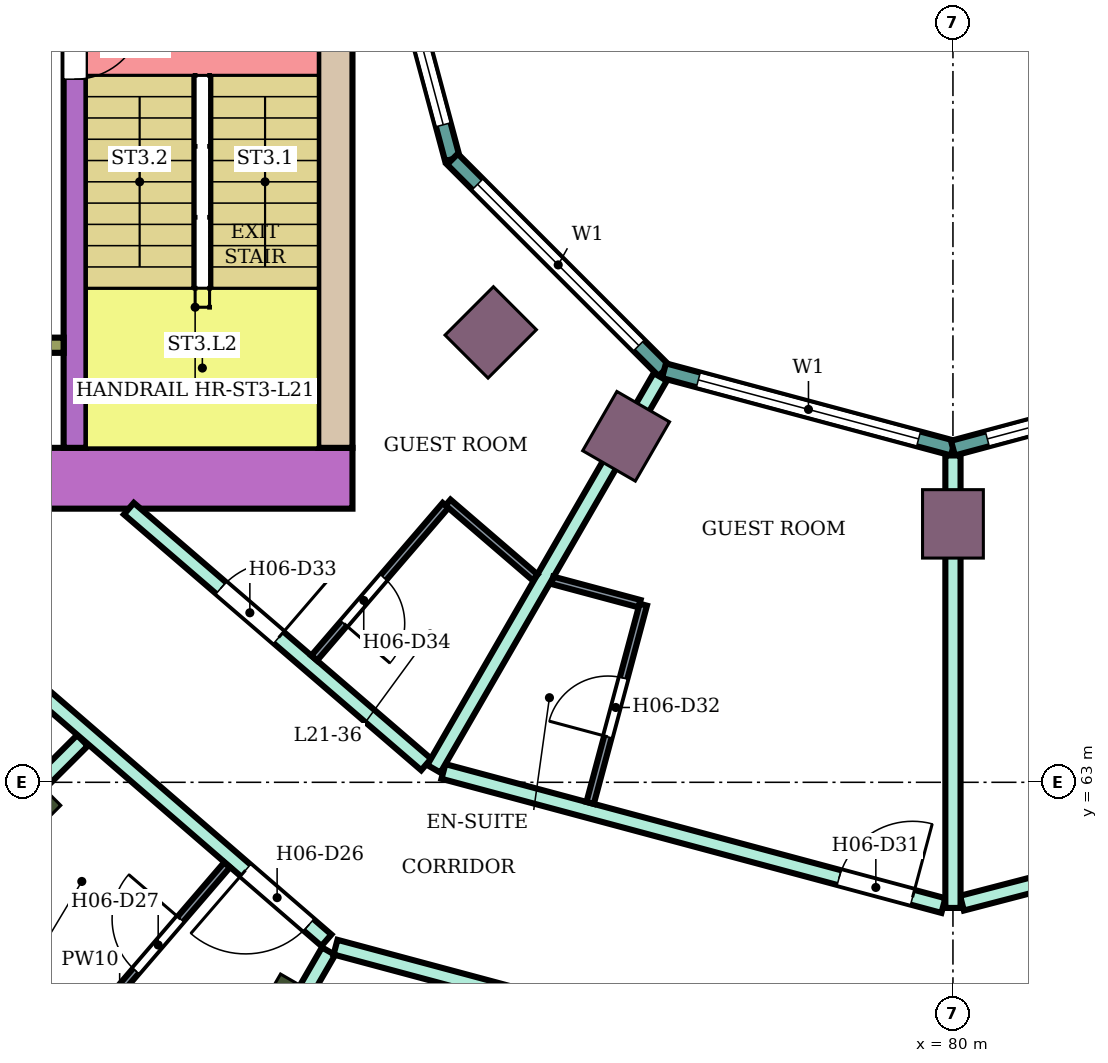
"""IFC4 building model, lengths in metres.
Left out: names, types, materials, properties, quantities, classifications, styles, units other than length and angle.
Written with IfcOpenShell. Run it as: python <this file> out.ifc"""

import sys

from ifc_helpers import new_model, si_unit, direction, frame, frame_2d, origin, origin_2d, place, context, subcontext, project, spatial, rectangle, extrude, element, fill, save


model = new_model("IFC4")
c1 = context("Model", 3, precision=1e-05, world=origin(), true_north=direction((0.0, 1.0)))
c2 = subcontext(c1, "Body", "Model", "MODEL_VIEW")
j1 = project(units=[si_unit("LENGTHUNIT", "METRE"), si_unit("PLANEANGLEUNIT", "RADIAN")], contexts=[c1])
p1 = place(None, origin())
s1 = spatial("IfcSite", under=j1, at=p1, CompositionType="ELEMENT")
p2 = place(p1, origin())
s2 = spatial("IfcBuilding", under=s1, at=p2, CompositionType="ELEMENT")
p3 = place(p2, frame((0.0, 0.0, 93.8)))
s3 = spatial("IfcBuildingStorey", under=s2, at=p3, CompositionType="ELEMENT", Elevation=93.8)
for number, where, z_axis, x_axis in (
    (1, (67.555, 62.555, 0.0), (0.0, 0.0, 1.0), (-0.707, -0.707, 0.0)),
    (2, (71.2, 59.758, 0.0), (0.0, 0.0, 1.0), (-0.5, -0.866, 0.0)),
):
    element("IfcColumn", number, at=place(p3, frame(where, z_axis=z_axis, x_axis=x_axis)), inside=s3, PredefinedType="COLUMN", context=c2, shape_type="SweptSolid", body=[
        extrude(rectangle(XDim=1.2, YDim=0.8, at=origin_2d()), origin(), (0.0, 0.0, 1.0), 3.8),
    ])
for number, where, z_axis, x_axis in (
    (3, (73.919, 68.919, 0.0), (0.0, 0.0, 1.0), (-0.707, -0.707, 0.0)),
    (4, (75.7, 67.552, 0.0), (0.0, 0.0, 1.0), (-0.5, -0.866, 0.0)),
    (5, (80.0, 66.4, 0.0), (0.0, 0.0, 1.0), (0.0, -1.0, 0.0)),
):
    element("IfcColumn", number, at=place(p3, frame(where, z_axis=z_axis, x_axis=x_axis)), inside=s3, PredefinedType="COLUMN", context=c2, shape_type="SweptSolid", body=[
        extrude(rectangle(XDim=0.9, YDim=0.8, at=origin_2d()), origin(), (0.0, 0.0, 1.0), 3.8),
    ])
p4 = place(p3, frame((72.1, 67.0, 0.0), z_axis=(0.0, 0.0, 1.0), x_axis=(-1.0, 0.0, 0.0)))
e6 = element("IfcWall", 6, at=p4, inside=s3, PredefinedType="SHEAR", context=c2, shape_type="SweptSolid", body=[
    extrude(rectangle(XDim=14.7, YDim=0.8, at=frame_2d((7.35, 0.0))), origin(), (0.0, 0.0, 1.0), 3.48),
])
p5 = place(p4, frame((4.2, 0.0, 0.0)))
e7 = element("IfcOpeningElement", 7, at=p5, cuts=e6, PredefinedType="OPENING", context=c2, shape_type="SweptSolid", body=[
    extrude(rectangle(XDim=2.4, YDim=2.4, at=frame_2d((1.2, 1.2))), frame((0.0, 0.41, 0.0), z_axis=(0.0, -1.0, 0.0), x_axis=(1.0, 0.0, 0.0)), (0.0, 0.0, 1.0), 0.82),
])
p6 = place(p3, frame((71.875, 75.0, 0.0), z_axis=(0.0, 0.0, 1.0), x_axis=(0.0, -1.0, 0.0)))
e8 = element("IfcWall", 8, at=p6, inside=s3, PredefinedType="SHEAR", context=c2, shape_type="SweptSolid", body=[
    extrude(rectangle(XDim=7.6, YDim=0.45, at=frame_2d((3.8, 0.0))), origin(), (0.0, 0.0, 1.0), 3.48),
])
p7 = place(p3, frame((68.45, 75.0, 0.0), z_axis=(0.0, 0.0, 1.0), x_axis=(0.0, -1.0, 0.0)))
e9 = element("IfcWall", 9, at=p7, inside=s3, PredefinedType="SHEAR", context=c2, shape_type="SweptSolid", body=[
    extrude(rectangle(XDim=7.6, YDim=0.3, at=frame_2d((3.8, 0.0))), origin(), (0.0, 0.0, 1.0), 3.48),
])
p8 = place(p7, frame((1.85, 0.0, 0.0)))
e10 = element("IfcOpeningElement", 10, at=p8, cuts=e9, PredefinedType="OPENING", context=c2, shape_type="SweptSolid", body=[
    extrude(rectangle(XDim=0.9, YDim=2.1, at=frame_2d((0.45, 1.05))), frame((0.0, 0.16, 0.0), z_axis=(0.0, -1.0, 0.0), x_axis=(1.0, 0.0, 0.0)), (0.0, 0.0, 1.0), 0.32),
])
p9 = place(p3, frame((68.3, 68.75, 0.0), z_axis=(0.0, 0.0, 1.0), x_axis=(-1.0, 0.0, 0.0)))
e11 = element("IfcWall", 11, at=p9, inside=s3, PredefinedType="SHEAR", context=c2, shape_type="SweptSolid", body=[
    extrude(rectangle(XDim=4.65, YDim=0.2, at=frame_2d((2.325, 0.0))), origin(), (0.0, 0.0, 1.0), 3.48),
])
p10 = place(p3, frame((72.396, 75.0, 0.0), z_axis=(0.0, 0.0, 1.0), x_axis=(0.258789828301, -0.965933654434, 0.0)))
e12 = element("IfcWall", 12, at=p10, inside=s3, PredefinedType="NOTDEFINED", context=c2, shape_type="SweptSolid", body=[
    extrude(rectangle(XDim=3.936, YDim=0.2, at=frame_2d((1.968, 0.0))), origin(), (0.0, 0.0, 1.0), 3.8),
])
p11 = place(p10, frame((0.468, 0.0, 0.9)))
e13 = element("IfcOpeningElement", 13, at=p11, cuts=e12, PredefinedType="OPENING", context=c2, shape_type="SweptSolid", body=[
    extrude(rectangle(XDim=3.0, YDim=2.3, at=frame_2d((1.5, 1.15))), frame((0.0, 0.11, 0.0), z_axis=(0.0, -1.0, 0.0), x_axis=(1.0, 0.0, 0.0)), (0.0, 0.0, 1.0), 0.22),
])
p12 = place(p3, frame((73.415, 71.198, 0.0), z_axis=(0.0, 0.0, 1.0), x_axis=(0.707106781187, -0.707106781187, 0.0)))
e14 = element("IfcWall", 14, at=p12, inside=s3, PredefinedType="NOTDEFINED", context=c2, shape_type="SweptSolid", body=[
    extrude(rectangle(XDim=3.936, YDim=0.2, at=frame_2d((1.968, 0.0))), origin(), (0.0, 0.0, 1.0), 3.8),
])
p13 = place(p12, frame((0.468, 0.0, 0.9)))
e15 = element("IfcOpeningElement", 15, at=p13, cuts=e14, PredefinedType="OPENING", context=c2, shape_type="SweptSolid", body=[
    extrude(rectangle(XDim=3.0, YDim=2.3, at=frame_2d((1.5, 1.15))), frame((0.0, 0.11, 0.0), z_axis=(0.0, -1.0, 0.0), x_axis=(1.0, 0.0, 0.0)), (0.0, 0.0, 1.0), 0.22),
])
p14 = place(p3, frame((76.198, 68.415, 0.0), z_axis=(0.0, 0.0, 1.0), x_axis=(0.965933654434, -0.258789828301, 0.0)))
e16 = element("IfcWall", 16, at=p14, inside=s3, PredefinedType="NOTDEFINED", context=c2, shape_type="SweptSolid", body=[
    extrude(rectangle(XDim=3.936, YDim=0.2, at=frame_2d((1.968, 0.0))), origin(), (0.0, 0.0, 1.0), 3.8),
])
p15 = place(p14, frame((0.468, 0.0, 0.9)))
e17 = element("IfcOpeningElement", 17, at=p15, cuts=e16, PredefinedType="OPENING", context=c2, shape_type="SweptSolid", body=[
    extrude(rectangle(XDim=3.0, YDim=2.3, at=frame_2d((1.5, 1.15))), frame((0.0, 0.11, 0.0), z_axis=(0.0, -1.0, 0.0), x_axis=(1.0, 0.0, 0.0)), (0.0, 0.0, 1.0), 0.22),
])
p16 = place(p3, frame((80.0, 67.396, 0.0), z_axis=(0.0, 0.0, 1.0), x_axis=(0.965933654434, 0.258789828301, 0.0)))
e18 = element("IfcWall", 18, at=p16, inside=s3, PredefinedType="NOTDEFINED", context=c2, shape_type="SweptSolid", body=[
    extrude(rectangle(XDim=3.936, YDim=0.2, at=frame_2d((1.968, 0.0))), origin(), (0.0, 0.0, 1.0), 3.8),
])
p17 = place(p16, frame((0.468, 0.0, 0.9)))
e19 = element("IfcOpeningElement", 19, at=p17, cuts=e18, PredefinedType="OPENING", context=c2, shape_type="SweptSolid", body=[
    extrude(rectangle(XDim=3.0, YDim=2.3, at=frame_2d((1.5, 1.15))), frame((0.0, 0.11, 0.0), z_axis=(0.0, -1.0, 0.0), x_axis=(1.0, 0.0, 0.0)), (0.0, 0.0, 1.0), 0.22),
])
p18 = place(p3, frame((63.594, 58.598, 0.0), z_axis=(0.0, 0.0, 1.0), x_axis=(0.707228748718, 0.706984792613, 0.0)))
e20 = element("IfcWall", 20, at=p18, inside=s3, PredefinedType="PARTITIONING", context=c2, shape_type="SweptSolid", body=[
    extrude(rectangle(XDim=7.005, YDim=0.2, at=frame_2d((3.503, 0.0))), origin(), (0.0, 0.0, 1.0), 3.35),
])
p19 = place(p3, frame((67.079, 64.968, 0.0), z_axis=(0.0, 0.0, 1.0), x_axis=(0.756371089567, -0.654142778656, 0.0)))
e21 = element("IfcWall", 21, at=p19, inside=s3, PredefinedType="PARTITIONING", context=c2, shape_type="SweptSolid", body=[
    extrude(rectangle(XDim=6.185, YDim=0.2, at=frame_2d((3.093, 0.0))), origin(), (0.0, 0.0, 1.0), 3.35),
])
p20 = place(p19, frame((4.778, 0.0, 0.0)))
e22 = element("IfcOpeningElement", 22, at=p20, cuts=e21, PredefinedType="OPENING", context=c2, shape_type="SweptSolid", body=[
    extrude(rectangle(XDim=1.1, YDim=2.1, at=frame_2d((0.55, 1.05))), frame((0.0, 0.11, 0.0), z_axis=(0.0, -1.0, 0.0), x_axis=(1.0, 0.0, 0.0)), (0.0, 0.0, 1.0), 0.22),
])
p21 = place(p3, frame((67.096, 52.662, 0.0), z_axis=(0.0, 0.0, 1.0), x_axis=(0.500222922337, 0.865896661253, 0.0)))
e23 = element("IfcWall", 23, at=p21, inside=s3, PredefinedType="PARTITIONING", context=c2, shape_type="SweptSolid", body=[
    extrude(rectangle(XDim=9.374, YDim=0.2, at=frame_2d((4.687, 0.0))), origin(), (0.0, 0.0, 1.0), 3.35),
])
p22 = place(p3, frame((69.158, 66.6, 0.0), z_axis=(0.0, 0.0, 1.0), x_axis=(0.757976058094, -0.652282373943, 0.0)))
e24 = element("IfcWall", 24, at=p22, inside=s3, PredefinedType="PARTITIONING", context=c2, shape_type="SweptSolid", body=[
    extrude(rectangle(XDim=5.16, YDim=0.2, at=frame_2d((2.58, 0.0))), origin(), (0.0, 0.0, 1.0), 3.35),
])
p23 = place(p22, frame((1.6, 0.0, 0.0)))
e25 = element("IfcOpeningElement", 25, at=p23, cuts=e24, PredefinedType="OPENING", context=c2, shape_type="SweptSolid", body=[
    extrude(rectangle(XDim=1.0, YDim=2.1, at=frame_2d((0.5, 1.05))), frame((0.0, 0.11, 0.0), z_axis=(0.0, -1.0, 0.0), x_axis=(1.0, 0.0, 0.0)), (0.0, 0.0, 1.0), 0.22),
])
p24 = place(p3, frame((71.877, 60.831, 0.0), z_axis=(0.0, 0.0, 1.0), x_axis=(0.965905026676, -0.258896657842, 0.0)))
e26 = element("IfcWall", 26, at=p24, inside=s3, PredefinedType="PARTITIONING", context=c2, shape_type="SweptSolid", body=[
    extrude(rectangle(XDim=8.36, YDim=0.2, at=frame_2d((4.18, 0.0))), origin(), (0.0, 0.0, 1.0), 3.35),
])
p25 = place(p24, frame((4.655, 0.0, 0.0)))
e27 = element("IfcOpeningElement", 27, at=p25, cuts=e26, PredefinedType="OPENING", context=c2, shape_type="SweptSolid", body=[
    extrude(rectangle(XDim=1.8, YDim=2.1, at=frame_2d((0.9, 1.05))), frame((0.0, 0.11, 0.0), z_axis=(0.0, -1.0, 0.0), x_axis=(1.0, 0.0, 0.0)), (0.0, 0.0, 1.0), 0.22),
])
p26 = place(p3, frame((73.297, 63.143, 0.0), z_axis=(0.0, 0.0, 1.0), x_axis=(0.965859030528, -0.25906820173, 0.0)))
e28 = element("IfcWall", 28, at=p26, inside=s3, PredefinedType="PARTITIONING", context=c2, shape_type="SweptSolid", body=[
    extrude(rectangle(XDim=6.81, YDim=0.2, at=frame_2d((3.405, 0.0))), origin(), (0.0, 0.0, 1.0), 3.35),
])
p27 = place(p26, frame((5.39, 0.0, 0.0)))
e29 = element("IfcOpeningElement", 29, at=p27, cuts=e28, PredefinedType="OPENING", context=c2, shape_type="SweptSolid", body=[
    extrude(rectangle(XDim=1.0, YDim=2.1, at=frame_2d((0.5, 1.05))), frame((0.0, 0.11, 0.0), z_axis=(0.0, -1.0, 0.0), x_axis=(1.0, 0.0, 0.0)), (0.0, 0.0, 1.0), 0.22),
])
p28 = place(p3, frame((73.171, 63.177, 0.0), z_axis=(0.0, 0.0, 1.0), x_axis=(0.500257106344, 0.865876912472, 0.0)))
e30 = element("IfcWall", 30, at=p28, inside=s3, PredefinedType="PARTITIONING", context=c2, shape_type="SweptSolid", body=[
    extrude(rectangle(XDim=5.955, YDim=0.2, at=frame_2d((2.978, 0.0))), origin(), (0.0, 0.0, 1.0), 3.35),
])
p29 = place(p3, frame((80.119, 61.41, 0.0), z_axis=(0.0, 0.0, 1.0), x_axis=(0.967823361235, 0.251630565408, 0.0)))
e31 = element("IfcWall", 31, at=p29, inside=s3, PredefinedType="PARTITIONING", context=c2, shape_type="SweptSolid", body=[
    extrude(rectangle(XDim=6.958, YDim=0.2, at=frame_2d((3.479, 0.0))), origin(), (0.0, 0.0, 1.0), 3.35),
])
p30 = place(p29, frame((2.529, 0.0, 0.0)))
e32 = element("IfcOpeningElement", 32, at=p30, cuts=e31, PredefinedType="OPENING", context=c2, shape_type="SweptSolid", body=[
    extrude(rectangle(XDim=1.8, YDim=2.1, at=frame_2d((0.9, 1.05))), frame((0.0, 0.11, 0.0), z_axis=(0.0, -1.0, 0.0), x_axis=(1.0, 0.0, 0.0)), (0.0, 0.0, 1.0), 0.22),
])
p31 = place(p3, frame((80.0, 58.655, 0.0), z_axis=(0.0, 0.0, 1.0), x_axis=(0.965967338894, 0.258664068224, 0.0)))
e33 = element("IfcWall", 33, at=p31, inside=s3, PredefinedType="PARTITIONING", context=c2, shape_type="SweptSolid", body=[
    extrude(rectangle(XDim=8.36, YDim=0.2, at=frame_2d((4.18, 0.0))), origin(), (0.0, 0.0, 1.0), 3.35),
])
p32 = place(p31, frame((6.86, 0.0, 0.0)))
e34 = element("IfcOpeningElement", 34, at=p32, cuts=e33, PredefinedType="OPENING", context=c2, shape_type="SweptSolid", body=[
    extrude(rectangle(XDim=1.0, YDim=2.1, at=frame_2d((0.5, 1.05))), frame((0.0, 0.11, 0.0), z_axis=(0.0, -1.0, 0.0), x_axis=(1.0, 0.0, 0.0)), (0.0, 0.0, 1.0), 0.22),
])
p33 = place(p3, frame((80.0, 61.347, 0.0), z_axis=(0.0, 0.0, 1.0), x_axis=(0.0, 1.0, 0.0)))
e35 = element("IfcWall", 35, at=p33, inside=s3, PredefinedType="PARTITIONING", context=c2, shape_type="SweptSolid", body=[
    extrude(rectangle(XDim=5.953, YDim=0.2, at=frame_2d((2.977, 0.0))), origin(), (0.0, 0.0, 1.0), 3.35),
])
p34 = place(p3, frame((66.576, 61.435, 0.0), z_axis=(0.0, 0.0, 1.0), x_axis=(0.757970550281, -0.652288774169, 0.0)))
e36 = element("IfcWall", 36, at=p34, inside=s3, PredefinedType="PARTITIONING", context=c2, shape_type="SweptSolid", body=[
    extrude(rectangle(XDim=2.576, YDim=0.1, at=frame_2d((1.288, 0.0))), origin(), (0.0, 0.0, 1.0), 3.35),
])
p35 = place(p3, frame((68.566, 59.722, 0.0), z_axis=(0.0, 0.0, 1.0), x_axis=(0.65193146671, 0.758277892803, 0.0)))
e37 = element("IfcWall", 37, at=p35, inside=s3, PredefinedType="PARTITIONING", context=c2, shape_type="SweptSolid", body=[
    extrude(rectangle(XDim=2.89, YDim=0.1, at=frame_2d((1.445, 0.0))), origin(), (0.0, 0.0, 1.0), 3.35),
])
p36 = place(p35, frame((1.05, 0.0, 0.0)))
e38 = element("IfcOpeningElement", 38, at=p36, cuts=e37, PredefinedType="OPENING", context=c2, shape_type="SweptSolid", body=[
    extrude(rectangle(XDim=0.9, YDim=2.1, at=frame_2d((0.45, 1.05))), frame((0.0, 0.06, 0.0), z_axis=(0.0, -1.0, 0.0), x_axis=(1.0, 0.0, 0.0)), (0.0, 0.0, 1.0), 0.12),
])
p37 = place(p3, frame((71.596, 64.635, 0.0), z_axis=(0.0, 0.0, 1.0), x_axis=(0.652285007511, 0.757973791748, 0.0)))
e39 = element("IfcWall", 39, at=p37, inside=s3, PredefinedType="PARTITIONING", context=c2, shape_type="SweptSolid", body=[
    extrude(rectangle(XDim=2.65, YDim=0.1, at=frame_2d((1.325, 0.0))), origin(), (0.0, 0.0, 1.0), 3.35),
])
p38 = place(p37, frame((0.6, 0.0, 0.0)))
e40 = element("IfcOpeningElement", 40, at=p38, cuts=e39, PredefinedType="OPENING", context=c2, shape_type="SweptSolid", body=[
    extrude(rectangle(XDim=0.8, YDim=2.1, at=frame_2d((0.4, 1.05))), frame((0.0, 0.06, 0.0), z_axis=(0.0, -1.0, 0.0), x_axis=(1.0, 0.0, 0.0)), (0.0, 0.0, 1.0), 0.12),
])
p39 = place(p3, frame((73.357, 66.681, 0.0), z_axis=(0.0, 0.0, 1.0), x_axis=(0.758263469747, -0.651948242154, 0.0)))
e41 = element("IfcWall", 41, at=p39, inside=s3, PredefinedType="PARTITIONING", context=c2, shape_type="SweptSolid", body=[
    extrude(rectangle(XDim=1.511, YDim=0.1, at=frame_2d((0.755, 0.0))), origin(), (0.0, 0.0, 1.0), 3.35),
])
p40 = place(p3, frame((74.729, 65.657, 0.0), z_axis=(0.0, 0.0, 1.0), x_axis=(0.965948051503, -0.258736085224, 0.0)))
e42 = element("IfcWall", 42, at=p40, inside=s3, PredefinedType="PARTITIONING", context=c2, shape_type="SweptSolid", body=[
    extrude(rectangle(XDim=1.189, YDim=0.1, at=frame_2d((0.594, 0.0))), origin(), (0.0, 0.0, 1.0), 3.35),
])
p41 = place(p3, frame((75.227, 62.729, 0.0), z_axis=(0.0, 0.0, 1.0), x_axis=(0.258945475746, 0.965891940432, 0.0)))
e43 = element("IfcWall", 43, at=p41, inside=s3, PredefinedType="PARTITIONING", context=c2, shape_type="SweptSolid", body=[
    extrude(rectangle(XDim=2.7, YDim=0.1, at=frame_2d((1.35, 0.0))), origin(), (0.0, 0.0, 1.0), 3.35),
])
p42 = place(p41, frame((0.9, 0.0, 0.0)))
e44 = element("IfcOpeningElement", 44, at=p42, cuts=e43, PredefinedType="OPENING", context=c2, shape_type="SweptSolid", body=[
    extrude(rectangle(XDim=0.8, YDim=2.1, at=frame_2d((0.4, 1.05))), frame((0.0, 0.06, 0.0), z_axis=(0.0, -1.0, 0.0), x_axis=(1.0, 0.0, 0.0)), (0.0, 0.0, 1.0), 0.12),
])
p43 = place(p11, origin())
e45 = element("IfcWindow", 45, at=p43, inside=s3, PartitioningType="SINGLE_PANEL", PredefinedType="WINDOW", context=c2, shape_type="SweptSolid", body=[
    extrude(rectangle(XDim=3.0, YDim=2.3, at=frame_2d((1.5, 1.15))), frame((0.0, 0.03, 0.0), z_axis=(0.0, -1.0, 0.0), x_axis=(1.0, 0.0, 0.0)), (0.0, 0.0, 1.0), 0.06),
])
fill(e13, e45)
p44 = place(p13, origin())
e46 = element("IfcWindow", 46, at=p44, inside=s3, PartitioningType="SINGLE_PANEL", PredefinedType="WINDOW", context=c2, shape_type="SweptSolid", body=[
    extrude(rectangle(XDim=3.0, YDim=2.3, at=frame_2d((1.5, 1.15))), frame((0.0, 0.03, 0.0), z_axis=(0.0, -1.0, 0.0), x_axis=(1.0, 0.0, 0.0)), (0.0, 0.0, 1.0), 0.06),
])
fill(e15, e46)
p45 = place(p15, origin())
e47 = element("IfcWindow", 47, at=p45, inside=s3, PartitioningType="SINGLE_PANEL", PredefinedType="WINDOW", context=c2, shape_type="SweptSolid", body=[
    extrude(rectangle(XDim=3.0, YDim=2.3, at=frame_2d((1.5, 1.15))), frame((0.0, 0.03, 0.0), z_axis=(0.0, -1.0, 0.0), x_axis=(1.0, 0.0, 0.0)), (0.0, 0.0, 1.0), 0.06),
])
fill(e17, e47)
p46 = place(p17, origin())
e48 = element("IfcWindow", 48, at=p46, inside=s3, PartitioningType="SINGLE_PANEL", PredefinedType="WINDOW", context=c2, shape_type="SweptSolid", body=[
    extrude(rectangle(XDim=3.0, YDim=2.3, at=frame_2d((1.5, 1.15))), frame((0.0, 0.03, 0.0), z_axis=(0.0, -1.0, 0.0), x_axis=(1.0, 0.0, 0.0)), (0.0, 0.0, 1.0), 0.06),
])
fill(e19, e48)
p47 = place(p20, frame((1.1, 0.0, 0.0), z_axis=(0.0, 0.0, 1.0), x_axis=(-1.0, 0.0, 0.0)))
e49 = element("IfcDoor", 49, at=p47, inside=s3, OperationType="SINGLE_SWING_RIGHT", PredefinedType="DOOR", context=c2, shape_type="SweptSolid", body=[
    extrude(rectangle(XDim=1.1, YDim=2.1, at=frame_2d((0.55, 1.05))), frame((0.0, 0.025, 0.0), z_axis=(0.0, -1.0, 0.0), x_axis=(1.0, 0.0, 0.0)), (0.0, 0.0, 1.0), 0.05),
])
fill(e22, e49)
p48 = place(p36, origin())
e50 = element("IfcDoor", 50, at=p48, inside=s3, OperationType="SINGLE_SWING_RIGHT", PredefinedType="DOOR", context=c2, shape_type="SweptSolid", body=[
    extrude(rectangle(XDim=0.9, YDim=2.1, at=frame_2d((0.45, 1.05))), frame((0.0, 0.025, 0.0), z_axis=(0.0, -1.0, 0.0), x_axis=(1.0, 0.0, 0.0)), (0.0, 0.0, 1.0), 0.05),
])
fill(e38, e50)
p49 = place(p27, origin())
e51 = element("IfcDoor", 51, at=p49, inside=s3, OperationType="SINGLE_SWING_RIGHT", PredefinedType="DOOR", context=c2, shape_type="SweptSolid", body=[
    extrude(rectangle(XDim=1.0, YDim=2.1, at=frame_2d((0.5, 1.05))), frame((0.0, 0.025, 0.0), z_axis=(0.0, -1.0, 0.0), x_axis=(1.0, 0.0, 0.0)), (0.0, 0.0, 1.0), 0.05),
])
fill(e29, e51)
p50 = place(p42, origin())
e52 = element("IfcDoor", 52, at=p50, inside=s3, OperationType="SINGLE_SWING_LEFT", PredefinedType="DOOR", context=c2, shape_type="SweptSolid", body=[
    extrude(rectangle(XDim=0.8, YDim=2.1, at=frame_2d((0.4, 1.05))), frame((0.0, 0.025, 0.0), z_axis=(0.0, -1.0, 0.0), x_axis=(1.0, 0.0, 0.0)), (0.0, 0.0, 1.0), 0.05),
])
fill(e44, e52)
p51 = place(p23, origin())
e53 = element("IfcDoor", 53, at=p51, inside=s3, OperationType="SINGLE_SWING_RIGHT", PredefinedType="DOOR", context=c2, shape_type="SweptSolid", body=[
    extrude(rectangle(XDim=1.0, YDim=2.1, at=frame_2d((0.5, 1.05))), frame((0.0, 0.025, 0.0), z_axis=(0.0, -1.0, 0.0), x_axis=(1.0, 0.0, 0.0)), (0.0, 0.0, 1.0), 0.05),
])
fill(e25, e53)
p52 = place(p38, frame((0.8, 0.0, 0.0), z_axis=(0.0, 0.0, 1.0), x_axis=(-1.0, 0.0, 0.0)))
e54 = element("IfcDoor", 54, at=p52, inside=s3, OperationType="SINGLE_SWING_RIGHT", PredefinedType="DOOR", context=c2, shape_type="SweptSolid", body=[
    extrude(rectangle(XDim=0.8, YDim=2.1, at=frame_2d((0.4, 1.05))), frame((0.0, 0.025, 0.0), z_axis=(0.0, -1.0, 0.0), x_axis=(1.0, 0.0, 0.0)), (0.0, 0.0, 1.0), 0.05),
])
fill(e40, e54)
p53 = place(p8, origin())
e55 = element("IfcDoor", 55, at=p53, inside=s3, OperationType="SINGLE_SWING_LEFT", PredefinedType="DOOR", context=c2, shape_type="SweptSolid", body=[
    extrude(rectangle(XDim=0.9, YDim=2.1, at=frame_2d((0.45, 1.05))), frame((0.0, 0.025, 0.0), z_axis=(0.0, -1.0, 0.0), x_axis=(1.0, 0.0, 0.0)), (0.0, 0.0, 1.0), 0.05),
])
fill(e10, e55)
save(model, sys.argv[1])
